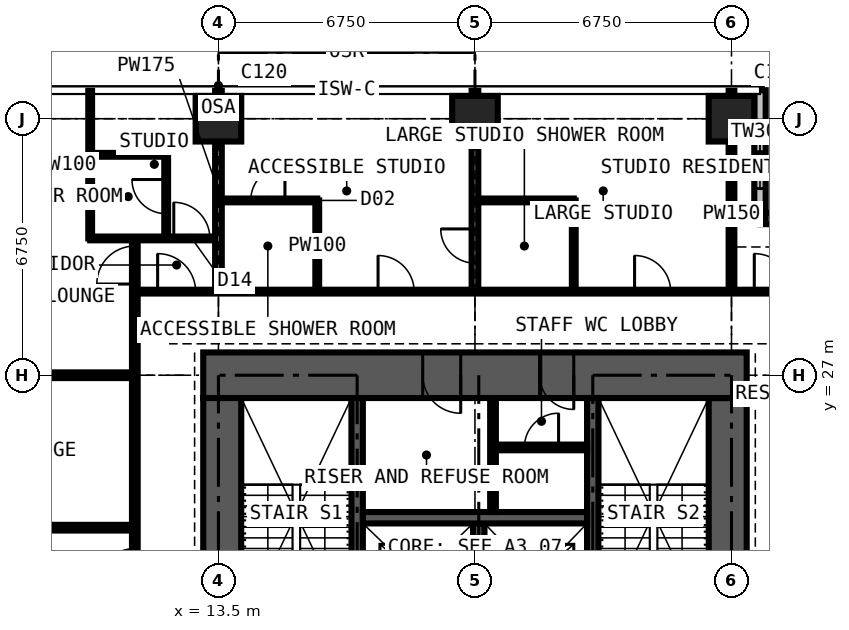
"""IFC4 building model, lengths in metres.
Left out: names, types, materials, properties, quantities, classifications, styles, units other than length and angle.
Written with IfcOpenShell. Run it as: python <this file> out.ifc"""

import sys

from ifc_helpers import new_model, si_unit, direction, frame, frame_2d, origin, origin_2d, place, context, subcontext, project, spatial, rectangle, extrude, element, fill, save


model = new_model("IFC4")
c1 = context("Model", 3, precision=1e-05, world=origin(), true_north=direction((0.0, 1.0)))
c2 = subcontext(c1, "Body", "Model", "MODEL_VIEW")
j1 = project(units=[si_unit("LENGTHUNIT", "METRE"), si_unit("PLANEANGLEUNIT", "RADIAN")], contexts=[c1])
p1 = place(None, origin())
s1 = spatial("IfcSite", under=j1, at=p1, CompositionType="ELEMENT")
p2 = place(p1, origin())
s2 = spatial("IfcBuilding", under=s1, at=p2, CompositionType="ELEMENT")
p3 = place(p2, frame((0.0, 0.0, 189.0)))
s3 = spatial("IfcBuildingStorey", under=s2, at=p3, CompositionType="ELEMENT", Elevation=189.0)
for number, where, z_axis, x_axis in (
    (1, (13.5, 33.75, 0.0), (0.0, 0.0, 1.0), (1.0, 0.0, 0.0)),
    (2, (20.25, 33.75, 0.0), (0.0, 0.0, 1.0), (1.0, 0.0, 0.0)),
    (3, (27.0, 33.75, 0.0), (0.0, 0.0, 1.0), (1.0, 0.0, 0.0)),
):
    element("IfcColumn", number, at=place(p3, frame(where, z_axis=z_axis, x_axis=x_axis)), inside=s3, PredefinedType="COLUMN", context=c2, shape_type="SweptSolid", body=[
        extrude(rectangle(XDim=1.2, YDim=1.2, at=origin_2d()), origin(), (0.0, 0.0, 1.0), 3.6),
    ])
p4 = place(p3, frame((26.9, 14.1, 0.0), z_axis=(0.0, 0.0, 1.0), x_axis=(0.0, 1.0, 0.0)))
e4 = element("IfcWall", 4, at=p4, inside=s3, PredefinedType="SHEAR", context=c2, shape_type="SweptSolid", body=[
    extrude(rectangle(XDim=12.3, YDim=1.0, at=frame_2d((6.15, 0.0))), origin(), (0.0, 0.0, 1.0), 3.6),
])
p5 = place(p4, frame((3.65, 0.0, 0.0)))
e5 = element("IfcOpeningElement", 5, at=p5, cuts=e4, PredefinedType="OPENING", context=c2, shape_type="SweptSolid", body=[
    extrude(rectangle(XDim=1.2, YDim=2.2, at=frame_2d((0.6, 1.1))), frame((0.0, 0.51, 0.0), z_axis=(0.0, -1.0, 0.0), x_axis=(1.0, 0.0, 0.0)), (0.0, 0.0, 1.0), 1.02),
])
p6 = place(p3, frame((27.4, 27.0, 0.0), z_axis=(0.0, 0.0, 1.0), x_axis=(-1.0, 0.0, 0.0)))
e6 = element("IfcWall", 6, at=p6, inside=s3, PredefinedType="SHEAR", context=c2, shape_type="SweptSolid", body=[
    extrude(rectangle(XDim=14.3, YDim=1.2, at=frame_2d((7.15, 0.0))), origin(), (0.0, 0.0, 1.0), 3.6),
])
p7 = place(p6, frame((4.55, 0.0, 0.0)))
e7 = element("IfcOpeningElement", 7, at=p7, cuts=e6, PredefinedType="OPENING", context=c2, shape_type="SweptSolid", body=[
    extrude(rectangle(XDim=0.9, YDim=2.2, at=frame_2d((0.45, 1.1))), frame((0.0, 0.61, 0.0), z_axis=(0.0, -1.0, 0.0), x_axis=(1.0, 0.0, 0.0)), (0.0, 0.0, 1.0), 1.22),
])
p8 = place(p6, frame((7.525, 0.0, 0.0)))
e8 = element("IfcOpeningElement", 8, at=p8, cuts=e6, PredefinedType="OPENING", context=c2, shape_type="SweptSolid", body=[
    extrude(rectangle(XDim=1.0, YDim=2.2, at=frame_2d((0.5, 1.1))), frame((0.0, 0.61, 0.0), z_axis=(0.0, -1.0, 0.0), x_axis=(1.0, 0.0, 0.0)), (0.0, 0.0, 1.0), 1.22),
])
p9 = place(p3, frame((13.6, 26.4, 0.0), z_axis=(0.0, 0.0, 1.0), x_axis=(0.0, -1.0, 0.0)))
e9 = element("IfcWall", 9, at=p9, inside=s3, PredefinedType="SHEAR", context=c2, shape_type="SweptSolid", body=[
    extrude(rectangle(XDim=12.3, YDim=1.0, at=frame_2d((6.15, 0.0))), origin(), (0.0, 0.0, 1.0), 3.6),
])
p10 = place(p9, frame((7.45, 0.0, 0.0)))
e10 = element("IfcOpeningElement", 10, at=p10, cuts=e9, PredefinedType="OPENING", context=c2, shape_type="SweptSolid", body=[
    extrude(rectangle(XDim=1.2, YDim=2.2, at=frame_2d((0.6, 1.1))), frame((0.0, 0.51, 0.0), z_axis=(0.0, -1.0, 0.0), x_axis=(1.0, 0.0, 0.0)), (0.0, 0.0, 1.0), 1.02),
])
p11 = place(p3, frame((31.125, 31.125, 0.0), z_axis=(0.0, 0.0, 1.0), x_axis=(-1.0, 0.0, 0.0)))
e11 = element("IfcWall", 11, at=p11, inside=s3, PredefinedType="SOLIDWALL", context=c2, shape_type="SweptSolid", body=[
    extrude(rectangle(XDim=3.375, YDim=0.3, at=frame_2d((1.688, 0.0))), origin(), (0.0, 0.0, 1.0), 3.375),
])
p12 = place(p11, frame((0.788, 0.0, 0.6)))
e12 = element("IfcOpeningElement", 12, at=p12, cuts=e11, PredefinedType="OPENING", context=c2, shape_type="SweptSolid", body=[
    extrude(rectangle(XDim=1.8, YDim=2.1, at=frame_2d((0.9, 1.05))), frame((0.0, 0.16, 0.0), z_axis=(0.0, -1.0, 0.0), x_axis=(1.0, 0.0, 0.0)), (0.0, 0.0, 1.0), 0.32),
])
p13 = place(p3, frame((27.75, 31.125, 0.0), z_axis=(0.0, 0.0, 1.0), x_axis=(0.0, 1.0, 0.0)))
e13 = element("IfcWall", 13, at=p13, inside=s3, PredefinedType="SOLIDWALL", context=c2, shape_type="SweptSolid", body=[
    extrude(rectangle(XDim=3.375, YDim=0.3, at=frame_2d((1.688, 0.0))), origin(), (0.0, 0.0, 1.0), 3.375),
])
p14 = place(p13, frame((0.788, 0.0, 0.6)))
e14 = element("IfcOpeningElement", 14, at=p14, cuts=e13, PredefinedType="OPENING", context=c2, shape_type="SweptSolid", body=[
    extrude(rectangle(XDim=1.8, YDim=2.1, at=frame_2d((0.9, 1.05))), frame((0.0, 0.16, 0.0), z_axis=(0.0, -1.0, 0.0), x_axis=(1.0, 0.0, 0.0)), (0.0, 0.0, 1.0), 0.32),
])
for number, where, z_axis, x_axis in (
    (15, (17.15, 20.3, 0.0), (0.0, 0.0, 1.0), (0.0, 1.0, 0.0)),
    (16, (23.35, 20.3, 0.0), (0.0, 0.0, 1.0), (0.0, 1.0, 0.0)),
):
    element("IfcWall", number, at=place(p3, frame(where, z_axis=z_axis, x_axis=x_axis)), inside=s3, PredefinedType="SHEAR", context=c2, shape_type="SweptSolid", body=[
        extrude(rectangle(XDim=6.1, YDim=0.3, at=frame_2d((3.05, 0.0))), origin(), (0.0, 0.0, 1.0), 3.6),
    ])
p15 = place(p3, frame((20.35, 20.3, 0.0), z_axis=(0.0, 0.0, 1.0), x_axis=(0.0, 1.0, 0.0)))
e17 = element("IfcWall", 17, at=p15, inside=s3, PredefinedType="SHEAR", context=c2, shape_type="SweptSolid", body=[
    extrude(rectangle(XDim=2.8, YDim=0.3, at=frame_2d((1.4, 0.0))), origin(), (0.0, 0.0, 1.0), 3.6),
])
p16 = place(p3, frame((17.3, 23.25, 0.0), z_axis=(0.0, 0.0, 1.0), x_axis=(1.0, 0.0, 0.0)))
e18 = element("IfcWall", 18, at=p16, inside=s3, PredefinedType="SHEAR", context=c2, shape_type="SweptSolid", body=[
    extrude(rectangle(XDim=5.9, YDim=0.3, at=frame_2d((2.95, 0.0))), origin(), (0.0, 0.0, 1.0), 3.6),
])
p17 = place(p3, frame((20.725, 23.4, 0.0), z_axis=(0.0, 0.0, 1.0), x_axis=(0.0, 1.0, 0.0)))
e19 = element("IfcWall", 19, at=p17, inside=s3, PredefinedType="PARTITIONING", context=c2, shape_type="SweptSolid", body=[
    extrude(rectangle(XDim=3.0, YDim=0.15, at=frame_2d((1.5, 0.0))), origin(), (0.0, 0.0, 1.0), 3.375),
])
p18 = place(p3, frame((20.8, 25.1, 0.0), z_axis=(0.0, 0.0, 1.0), x_axis=(1.0, 0.0, 0.0)))
e20 = element("IfcWall", 20, at=p18, inside=s3, PredefinedType="PARTITIONING", context=c2, shape_type="SweptSolid", body=[
    extrude(rectangle(XDim=2.4, YDim=0.15, at=frame_2d((1.2, 0.0))), origin(), (0.0, 0.0, 1.0), 3.375),
])
p19 = place(p18, frame((0.75, 0.0, 0.0)))
e21 = element("IfcOpeningElement", 21, at=p19, cuts=e20, PredefinedType="OPENING", context=c2, shape_type="SweptSolid", body=[
    extrude(rectangle(XDim=0.9, YDim=2.2, at=frame_2d((0.45, 1.1))), frame((0.0, 0.085, 0.0), z_axis=(0.0, -1.0, 0.0), x_axis=(1.0, 0.0, 0.0)), (0.0, 0.0, 1.0), 0.17),
])
p20 = place(p3, frame((3.35, 27.0, 0.0), z_axis=(0.0, 0.0, 1.0), x_axis=(1.0, 0.0, 0.0)))
e22 = element("IfcWall", 22, at=p20, inside=s3, PredefinedType="PARTITIONING", context=c2, shape_type="SweptSolid", body=[
    extrude(rectangle(XDim=7.95, YDim=0.15, at=frame_2d((3.975, 0.0))), origin(), (0.0, 0.0, 1.0), 2.806),
])
p21 = place(p3, frame((4.85, 22.988, 0.0), z_axis=(0.0, 0.0, 1.0), x_axis=(1.0, 0.0, 0.0)))
e23 = element("IfcWall", 23, at=p21, inside=s3, PredefinedType="PARTITIONING", context=c2, shape_type="SweptSolid", body=[
    extrude(rectangle(XDim=6.45, YDim=0.15, at=frame_2d((3.225, 0.0))), origin(), (0.0, 0.0, 1.0), 3.375),
])
p22 = place(p21, frame((2.75, 0.0, 0.0)))
e24 = element("IfcOpeningElement", 24, at=p22, cuts=e23, PredefinedType="OPENING", context=c2, shape_type="SweptSolid", body=[
    extrude(rectangle(XDim=0.95, YDim=2.2, at=frame_2d((0.475, 1.1))), frame((0.0, 0.085, 0.0), z_axis=(0.0, -1.0, 0.0), x_axis=(1.0, 0.0, 0.0)), (0.0, 0.0, 1.0), 0.17),
])
p23 = place(p3, frame((10.125, 30.6, 0.0), z_axis=(0.0, 0.0, 1.0), x_axis=(0.0, 1.0, 0.0)))
e25 = element("IfcWall", 25, at=p23, inside=s3, PredefinedType="PARTITIONING", context=c2, shape_type="SweptSolid", body=[
    extrude(rectangle(XDim=3.884, YDim=0.1, at=frame_2d((1.942, 0.0))), origin(), (0.0, 0.0, 1.0), 3.375),
])
p24 = place(p3, frame((10.125, 30.6, 0.0), z_axis=(0.0, 0.0, 1.0), x_axis=(1.0, 0.0, 0.0)))
e26 = element("IfcWall", 26, at=p24, inside=s3, PredefinedType="PARTITIONING", context=c2, shape_type="SweptSolid", body=[
    extrude(rectangle(XDim=3.375, YDim=0.1, at=frame_2d((1.688, 0.0))), origin(), (0.0, 0.0, 1.0), 3.375),
])
p25 = place(p24, frame((2.2, 0.0, 0.0)))
e27 = element("IfcOpeningElement", 27, at=p25, cuts=e26, PredefinedType="OPENING", context=c2, shape_type="SweptSolid", body=[
    extrude(rectangle(XDim=0.95, YDim=2.2, at=frame_2d((0.475, 1.1))), frame((0.0, 0.06, 0.0), z_axis=(0.0, -1.0, 0.0), x_axis=(1.0, 0.0, 0.0)), (0.0, 0.0, 1.0), 0.12),
])
p26 = place(p3, frame((10.125, 32.8, 0.0), z_axis=(0.0, 0.0, 1.0), x_axis=(1.0, 0.0, 0.0)))
e28 = element("IfcWall", 28, at=p26, inside=s3, PredefinedType="PARTITIONING", context=c2, shape_type="SweptSolid", body=[
    extrude(rectangle(XDim=2.0, YDim=0.1, at=frame_2d((1.0, 0.0))), origin(), (0.0, 0.0, 1.0), 3.375),
])
p27 = place(p3, frame((11.3, 11.3, 0.0), z_axis=(0.0, 0.0, 1.0), x_axis=(0.0, 1.0, 0.0)))
e29 = element("IfcWall", 29, at=p27, inside=s3, PredefinedType="PARTITIONING", context=c2, shape_type="SweptSolid", body=[
    extrude(rectangle(XDim=19.3, YDim=0.15, at=frame_2d((9.65, 0.0))), origin(), (0.0, 0.0, 1.0), 3.375),
])
p28 = place(p27, frame((18.1, 0.0, 0.0)))
e30 = element("IfcOpeningElement", 30, at=p28, cuts=e29, PredefinedType="OPENING", context=c2, shape_type="SweptSolid", body=[
    extrude(rectangle(XDim=1.0, YDim=2.2, at=frame_2d((0.5, 1.1))), frame((0.0, 0.085, 0.0), z_axis=(0.0, -1.0, 0.0), x_axis=(1.0, 0.0, 0.0)), (0.0, 0.0, 1.0), 0.17),
])
p29 = place(p27, frame((10.137, 0.0, 0.0)))
e31 = element("IfcOpeningElement", 31, at=p29, cuts=e29, PredefinedType="OPENING", context=c2, shape_type="SweptSolid", body=[
    extrude(rectangle(XDim=1.0, YDim=2.2, at=frame_2d((0.5, 1.1))), frame((0.0, 0.085, 0.0), z_axis=(0.0, -1.0, 0.0), x_axis=(1.0, 0.0, 0.0)), (0.0, 0.0, 1.0), 0.17),
])
p30 = place(p3, frame((11.3, 29.2, 0.0), z_axis=(0.0, 0.0, 1.0), x_axis=(1.0, 0.0, 0.0)))
e32 = element("IfcWall", 32, at=p30, inside=s3, PredefinedType="PARTITIONING", context=c2, shape_type="SweptSolid", body=[
    extrude(rectangle(XDim=19.809, YDim=0.1, at=frame_2d((9.904, 0.0))), origin(), (0.0, 0.0, 1.0), 3.375),
])
p31 = place(p30, frame((16.3, 0.0, 0.0)))
e33 = element("IfcOpeningElement", 33, at=p31, cuts=e32, PredefinedType="OPENING", context=c2, shape_type="SweptSolid", body=[
    extrude(rectangle(XDim=1.0, YDim=2.2, at=frame_2d((0.5, 1.1))), frame((0.0, 0.06, 0.0), z_axis=(0.0, -1.0, 0.0), x_axis=(1.0, 0.0, 0.0)), (0.0, 0.0, 1.0), 0.12),
])
p32 = place(p30, frame((6.4, 0.0, 0.0)))
e34 = element("IfcOpeningElement", 34, at=p32, cuts=e32, PredefinedType="OPENING", context=c2, shape_type="SweptSolid", body=[
    extrude(rectangle(XDim=0.95, YDim=2.2, at=frame_2d((0.475, 1.1))), frame((0.0, 0.06, 0.0), z_axis=(0.0, -1.0, 0.0), x_axis=(1.0, 0.0, 0.0)), (0.0, 0.0, 1.0), 0.12),
])
p33 = place(p30, frame((13.15, 0.0, 0.0)))
e35 = element("IfcOpeningElement", 35, at=p33, cuts=e32, PredefinedType="OPENING", context=c2, shape_type="SweptSolid", body=[
    extrude(rectangle(XDim=0.95, YDim=2.2, at=frame_2d((0.475, 1.1))), frame((0.0, 0.06, 0.0), z_axis=(0.0, -1.0, 0.0), x_axis=(1.0, 0.0, 0.0)), (0.0, 0.0, 1.0), 0.12),
])
p34 = place(p30, frame((0.6, 0.0, 0.0)))
e36 = element("IfcOpeningElement", 36, at=p34, cuts=e32, PredefinedType="OPENING", context=c2, shape_type="SweptSolid", body=[
    extrude(rectangle(XDim=1.0, YDim=2.2, at=frame_2d((0.5, 1.1))), frame((0.0, 0.06, 0.0), z_axis=(0.0, -1.0, 0.0), x_axis=(1.0, 0.0, 0.0)), (0.0, 0.0, 1.0), 0.12),
])
p35 = place(p3, frame((12.125, 30.6, 0.0), z_axis=(0.0, 0.0, 1.0), x_axis=(0.0, 1.0, 0.0)))
e37 = element("IfcWall", 37, at=p35, inside=s3, PredefinedType="PARTITIONING", context=c2, shape_type="SweptSolid", body=[
    extrude(rectangle(XDim=2.2, YDim=0.1, at=frame_2d((1.1, 0.0))), origin(), (0.0, 0.0, 1.0), 3.375),
])
p36 = place(p35, frame((0.65, 0.0, 0.0)))
e38 = element("IfcOpeningElement", 38, at=p36, cuts=e37, PredefinedType="OPENING", context=c2, shape_type="SweptSolid", body=[
    extrude(rectangle(XDim=0.9, YDim=2.2, at=frame_2d((0.45, 1.1))), frame((0.0, 0.06, 0.0), z_axis=(0.0, -1.0, 0.0), x_axis=(1.0, 0.0, 0.0)), (0.0, 0.0, 1.0), 0.12),
])
p37 = place(p3, frame((13.5, 29.2, 0.0), z_axis=(0.0, 0.0, 1.0), x_axis=(0.0, 1.0, 0.0)))
e39 = element("IfcWall", 39, at=p37, inside=s3, PredefinedType="PARTITIONING", context=c2, shape_type="SweptSolid", body=[
    extrude(rectangle(XDim=5.284, YDim=0.175, at=frame_2d((2.642, 0.0))), origin(), (0.0, 0.0, 1.0), 2.61),
])
p38 = place(p3, frame((13.5, 31.6, 0.0), z_axis=(0.0, 0.0, 1.0), x_axis=(1.0, 0.0, 0.0)))
e40 = element("IfcWall", 40, at=p38, inside=s3, PredefinedType="PARTITIONING", context=c2, shape_type="SweptSolid", body=[
    extrude(rectangle(XDim=2.6, YDim=0.1, at=frame_2d((1.3, 0.0))), origin(), (0.0, 0.0, 1.0), 3.375),
])
p39 = place(p38, frame((0.85, 0.0, 0.0)))
e41 = element("IfcOpeningElement", 41, at=p39, cuts=e40, PredefinedType="OPENING", context=c2, shape_type="SweptSolid", body=[
    extrude(rectangle(XDim=0.9, YDim=2.2, at=frame_2d((0.45, 1.1))), frame((0.0, 0.06, 0.0), z_axis=(0.0, -1.0, 0.0), x_axis=(1.0, 0.0, 0.0)), (0.0, 0.0, 1.0), 0.12),
])
p40 = place(p3, frame((16.1, 29.2, 0.0), z_axis=(0.0, 0.0, 1.0), x_axis=(0.0, 1.0, 0.0)))
e42 = element("IfcWall", 42, at=p40, inside=s3, PredefinedType="PARTITIONING", context=c2, shape_type="SweptSolid", body=[
    extrude(rectangle(XDim=2.4, YDim=0.1, at=frame_2d((1.2, 0.0))), origin(), (0.0, 0.0, 1.0), 3.375),
])
p41 = place(p3, frame((20.25, 29.2, 0.0), z_axis=(0.0, 0.0, 1.0), x_axis=(0.0, 1.0, 0.0)))
e43 = element("IfcWall", 43, at=p41, inside=s3, PredefinedType="PARTITIONING", context=c2, shape_type="SweptSolid", body=[
    extrude(rectangle(XDim=5.284, YDim=0.175, at=frame_2d((2.642, 0.0))), origin(), (0.0, 0.0, 1.0), 2.61),
])
p42 = place(p41, frame((0.75, 0.0, 0.0)))
e44 = element("IfcOpeningElement", 44, at=p42, cuts=e43, PredefinedType="OPENING", context=c2, shape_type="SweptSolid", body=[
    extrude(rectangle(XDim=0.9, YDim=2.2, at=frame_2d((0.45, 1.1))), frame((0.0, 0.097, 0.0), z_axis=(0.0, -1.0, 0.0), x_axis=(1.0, 0.0, 0.0)), (0.0, 0.0, 1.0), 0.195),
])
p43 = place(p3, frame((20.25, 31.6, 0.0), z_axis=(0.0, 0.0, 1.0), x_axis=(1.0, 0.0, 0.0)))
e45 = element("IfcWall", 45, at=p43, inside=s3, PredefinedType="PARTITIONING", context=c2, shape_type="SweptSolid", body=[
    extrude(rectangle(XDim=2.6, YDim=0.1, at=frame_2d((1.3, 0.0))), origin(), (0.0, 0.0, 1.0), 3.375),
])
p44 = place(p3, frame((22.85, 29.2, 0.0), z_axis=(0.0, 0.0, 1.0), x_axis=(0.0, 1.0, 0.0)))
e46 = element("IfcWall", 46, at=p44, inside=s3, PredefinedType="PARTITIONING", context=c2, shape_type="SweptSolid", body=[
    extrude(rectangle(XDim=2.4, YDim=0.1, at=frame_2d((1.2, 0.0))), origin(), (0.0, 0.0, 1.0), 3.375),
])
p45 = place(p3, frame((27.0, 29.2, 0.0), z_axis=(0.0, 0.0, 1.0), x_axis=(0.0, 1.0, 0.0)))
e47 = element("IfcWall", 47, at=p45, inside=s3, PredefinedType="PARTITIONING", context=c2, shape_type="SweptSolid", body=[
    extrude(rectangle(XDim=5.284, YDim=0.15, at=frame_2d((2.642, 0.0))), origin(), (0.0, 0.0, 1.0), 2.806),
])
p46 = place(p14, origin())
e48 = element("IfcWindow", 48, at=p46, inside=s3, PartitioningType="SINGLE_PANEL", PredefinedType="WINDOW", context=c2, shape_type="SweptSolid", body=[
    extrude(rectangle(XDim=1.8, YDim=2.1, at=frame_2d((0.9, 1.05))), frame((0.0, 0.03, 0.0), z_axis=(0.0, -1.0, 0.0), x_axis=(1.0, 0.0, 0.0)), (0.0, 0.0, 1.0), 0.06),
])
fill(e14, e48)
p47 = place(p19, origin())
e49 = element("IfcDoor", 49, at=p47, inside=s3, OperationType="SINGLE_SWING_RIGHT", PredefinedType="DOOR", context=c2, shape_type="SweptSolid", body=[
    extrude(rectangle(XDim=0.9, YDim=2.2, at=frame_2d((0.45, 1.1))), frame((0.0, 0.025, 0.0), z_axis=(0.0, -1.0, 0.0), x_axis=(1.0, 0.0, 0.0)), (0.0, 0.0, 1.0), 0.05),
])
fill(e21, e49)
p48 = place(p7, origin())
e50 = element("IfcDoor", 50, at=p48, inside=s3, OperationType="SINGLE_SWING_LEFT", PredefinedType="DOOR", context=c2, shape_type="SweptSolid", body=[
    extrude(rectangle(XDim=0.9, YDim=2.2, at=frame_2d((0.45, 1.1))), frame((0.0, 0.4, 0.0), z_axis=(0.0, -1.0, 0.0), x_axis=(1.0, 0.0, 0.0)), (0.0, 0.0, 1.0), 0.8),
])
fill(e7, e50)
p49 = place(p8, origin())
e51 = element("IfcDoor", 51, at=p49, inside=s3, OperationType="SINGLE_SWING_LEFT", PredefinedType="DOOR", context=c2, shape_type="SweptSolid", body=[
    extrude(rectangle(XDim=1.0, YDim=2.2, at=frame_2d((0.5, 1.1))), frame((0.0, 0.025, 0.0), z_axis=(0.0, -1.0, 0.0), x_axis=(1.0, 0.0, 0.0)), (0.0, 0.0, 1.0), 0.05),
])
fill(e8, e51)
p50 = place(p31, origin())
e52 = element("IfcDoor", 52, at=p50, inside=s3, OperationType="SINGLE_SWING_LEFT", PredefinedType="DOOR", context=c2, shape_type="SweptSolid", body=[
    extrude(rectangle(XDim=1.0, YDim=2.2, at=frame_2d((0.5, 1.1))), frame((0.0, 0.025, 0.0), z_axis=(0.0, -1.0, 0.0), x_axis=(1.0, 0.0, 0.0)), (0.0, 0.0, 1.0), 0.05),
])
fill(e33, e52)
p51 = place(p32, origin())
e53 = element("IfcDoor", 53, at=p51, inside=s3, OperationType="SINGLE_SWING_LEFT", PredefinedType="DOOR", context=c2, shape_type="SweptSolid", body=[
    extrude(rectangle(XDim=0.95, YDim=2.2, at=frame_2d((0.475, 1.1))), frame((0.0, 0.025, 0.0), z_axis=(0.0, -1.0, 0.0), x_axis=(1.0, 0.0, 0.0)), (0.0, 0.0, 1.0), 0.05),
])
fill(e34, e53)
p52 = place(p39, origin())
e54 = element("IfcDoor", 54, at=p52, inside=s3, OperationType="SINGLE_SWING_RIGHT", PredefinedType="DOOR", context=c2, shape_type="SweptSolid", body=[
    extrude(rectangle(XDim=0.9, YDim=2.2, at=frame_2d((0.45, 1.1))), frame((0.0, 0.025, 0.0), z_axis=(0.0, -1.0, 0.0), x_axis=(1.0, 0.0, 0.0)), (0.0, 0.0, 1.0), 0.05),
])
fill(e41, e54)
p53 = place(p33, origin())
e55 = element("IfcDoor", 55, at=p53, inside=s3, OperationType="SINGLE_SWING_LEFT", PredefinedType="DOOR", context=c2, shape_type="SweptSolid", body=[
    extrude(rectangle(XDim=0.95, YDim=2.2, at=frame_2d((0.475, 1.1))), frame((0.0, 0.025, 0.0), z_axis=(0.0, -1.0, 0.0), x_axis=(1.0, 0.0, 0.0)), (0.0, 0.0, 1.0), 0.05),
])
fill(e35, e55)
p54 = place(p42, origin())
e56 = element("IfcDoor", 56, at=p54, inside=s3, OperationType="SINGLE_SWING_RIGHT", PredefinedType="DOOR", context=c2, shape_type="SweptSolid", body=[
    extrude(rectangle(XDim=0.9, YDim=2.2, at=frame_2d((0.45, 1.1))), frame((0.0, 0.025, 0.0), z_axis=(0.0, -1.0, 0.0), x_axis=(1.0, 0.0, 0.0)), (0.0, 0.0, 1.0), 0.05),
])
fill(e44, e56)
p55 = place(p25, origin())
e57 = element("IfcDoor", 57, at=p55, inside=s3, OperationType="SINGLE_SWING_LEFT", PredefinedType="DOOR", context=c2, shape_type="SweptSolid", body=[
    extrude(rectangle(XDim=0.95, YDim=2.2, at=frame_2d((0.475, 1.1))), frame((0.0, 0.025, 0.0), z_axis=(0.0, -1.0, 0.0), x_axis=(1.0, 0.0, 0.0)), (0.0, 0.0, 1.0), 0.05),
])
fill(e27, e57)
p56 = place(p36, origin())
e58 = element("IfcDoor", 58, at=p56, inside=s3, OperationType="SINGLE_SWING_RIGHT", PredefinedType="DOOR", context=c2, shape_type="SweptSolid", body=[
    extrude(rectangle(XDim=0.9, YDim=2.2, at=frame_2d((0.45, 1.1))), frame((0.0, 0.025, 0.0), z_axis=(0.0, -1.0, 0.0), x_axis=(1.0, 0.0, 0.0)), (0.0, 0.0, 1.0), 0.05),
])
fill(e38, e58)
p57 = place(p34, origin())
e59 = element("IfcDoor", 59, at=p57, inside=s3, OperationType="SINGLE_SWING_LEFT", PredefinedType="DOOR", context=c2, shape_type="SweptSolid", body=[
    extrude(rectangle(XDim=1.0, YDim=2.2, at=frame_2d((0.5, 1.1))), frame((0.0, 0.025, 0.0), z_axis=(0.0, -1.0, 0.0), x_axis=(1.0, 0.0, 0.0)), (0.0, 0.0, 1.0), 0.05),
])
fill(e36, e59)
p58 = place(p28, origin())
e60 = element("IfcDoor", 60, at=p58, inside=s3, OperationType="SINGLE_SWING_LEFT", PredefinedType="DOOR", context=c2, shape_type="SweptSolid", body=[
    extrude(rectangle(XDim=1.0, YDim=2.2, at=frame_2d((0.5, 1.1))), frame((0.0, 0.025, 0.0), z_axis=(0.0, -1.0, 0.0), x_axis=(1.0, 0.0, 0.0)), (0.0, 0.0, 1.0), 0.05),
])
fill(e30, e60)
p59 = place(p29, origin())
e61 = element("IfcDoor", 61, at=p59, inside=s3, OperationType="SINGLE_SWING_LEFT", PredefinedType="DOOR", context=c2, shape_type="SweptSolid", body=[
    extrude(rectangle(XDim=1.0, YDim=2.2, at=frame_2d((0.5, 1.1))), frame((0.0, 0.025, 0.0), z_axis=(0.0, -1.0, 0.0), x_axis=(1.0, 0.0, 0.0)), (0.0, 0.0, 1.0), 0.05),
])
fill(e31, e61)
save(model, sys.argv[1])
